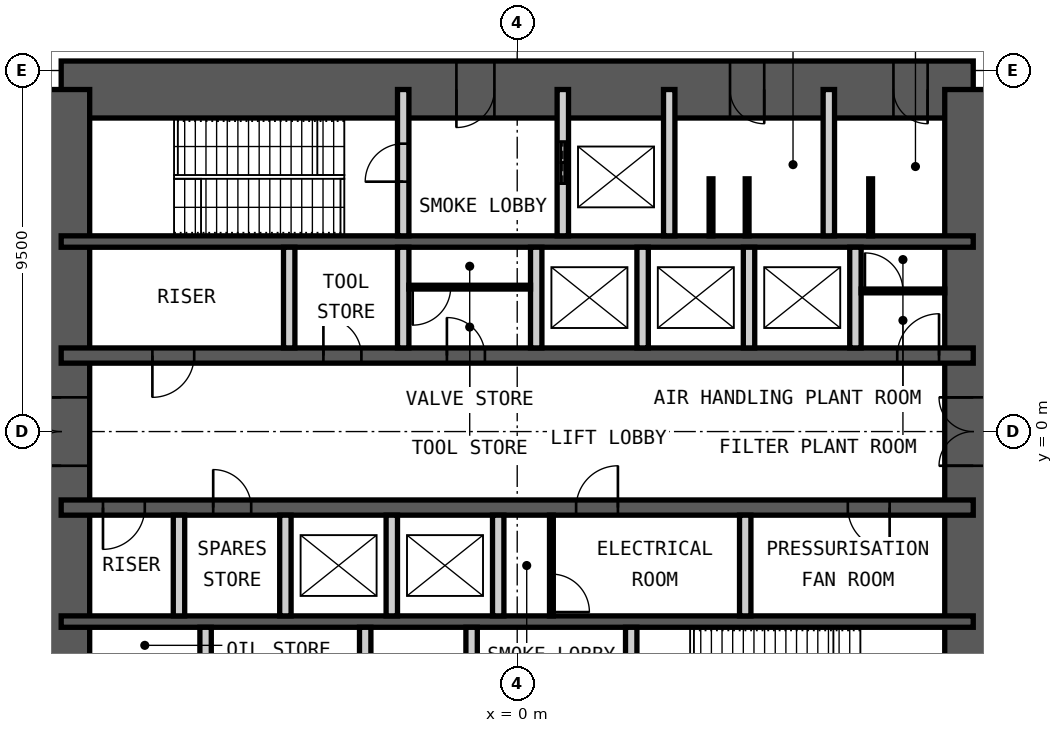
"""IFC4 building model, lengths in metres.
Left out: names, types, materials, properties, quantities, classifications, styles, units other than length and angle.
Written with IfcOpenShell. Run it as: python <this file> out.ifc"""

import sys

from ifc_helpers import new_model, si_unit, direction, frame, frame_2d, origin, place, context, subcontext, project, spatial, rectangle, extrude, element, fill, save


model = new_model("IFC4")
c1 = context("Model", 3, precision=1e-05, world=origin(), true_north=direction((0.0, 1.0)))
c2 = subcontext(c1, "Body", "Model", "MODEL_VIEW")
j1 = project(units=[si_unit("LENGTHUNIT", "METRE"), si_unit("PLANEANGLEUNIT", "RADIAN")], contexts=[c1])
p1 = place(None, origin())
s1 = spatial("IfcSite", under=j1, at=p1, CompositionType="ELEMENT")
p2 = place(p1, origin())
s2 = spatial("IfcBuilding", under=s1, at=p2, CompositionType="ELEMENT")
p3 = place(p2, frame((0.0, 0.0, 174.4)))
s3 = spatial("IfcBuildingStorey", under=s2, at=p3, CompositionType="ELEMENT", Elevation=174.4)
p4 = place(p3, frame((-12.0, 9.0, 0.0), z_axis=(0.0, 0.0, 1.0), x_axis=(1.0, 0.0, 0.0)))
e1 = element("IfcWall", 1, at=p4, inside=s3, PredefinedType="SHEAR", context=c2, shape_type="SweptSolid", body=[
    extrude(rectangle(XDim=24.0, YDim=1.5, at=frame_2d((12.0, 0.0))), origin(), (0.0, 0.0, 1.0), 6.0),
])
p5 = place(p4, frame((10.4, 0.0, 0.0)))
e2 = element("IfcOpeningElement", 2, at=p5, cuts=e1, PredefinedType="OPENING", context=c2, shape_type="SweptSolid", body=[
    extrude(rectangle(XDim=1.0, YDim=2.1, at=frame_2d((0.5, 1.05))), frame((0.0, 0.76, 0.0), z_axis=(0.0, -1.0, 0.0), x_axis=(1.0, 0.0, 0.0)), (0.0, 0.0, 1.0), 1.52),
])
p6 = place(p4, frame((17.6, 0.0, 0.0)))
e3 = element("IfcOpeningElement", 3, at=p6, cuts=e1, PredefinedType="OPENING", context=c2, shape_type="SweptSolid", body=[
    extrude(rectangle(XDim=0.9, YDim=2.1, at=frame_2d((0.45, 1.05))), frame((0.0, 0.76, 0.0), z_axis=(0.0, -1.0, 0.0), x_axis=(1.0, 0.0, 0.0)), (0.0, 0.0, 1.0), 1.52),
])
p7 = place(p4, frame((21.9, 0.0, 0.0)))
e4 = element("IfcOpeningElement", 4, at=p7, cuts=e1, PredefinedType="OPENING", context=c2, shape_type="SweptSolid", body=[
    extrude(rectangle(XDim=0.9, YDim=2.1, at=frame_2d((0.45, 1.05))), frame((0.0, 0.76, 0.0), z_axis=(0.0, -1.0, 0.0), x_axis=(1.0, 0.0, 0.0)), (0.0, 0.0, 1.0), 1.52),
])
p8 = place(p3, frame((12.0, -9.0, 0.0), z_axis=(0.0, 0.0, 1.0), x_axis=(0.0, 1.0, 0.0)))
e5 = element("IfcWall", 5, at=p8, inside=s3, PredefinedType="SHEAR", context=c2, shape_type="SweptSolid", body=[
    extrude(rectangle(XDim=18.0, YDim=1.5, at=frame_2d((9.0, 0.0))), origin(), (0.0, 0.0, 1.0), 6.0),
])
p9 = place(p8, frame((8.1, 0.0, 0.0)))
e6 = element("IfcOpeningElement", 6, at=p9, cuts=e5, PredefinedType="OPENING", context=c2, shape_type="SweptSolid", body=[
    extrude(rectangle(XDim=1.8, YDim=2.1, at=frame_2d((0.9, 1.05))), frame((0.0, 0.76, 0.0), z_axis=(0.0, -1.0, 0.0), x_axis=(1.0, 0.0, 0.0)), (0.0, 0.0, 1.0), 1.52),
])
p10 = place(p3, frame((-12.0, -9.0, 0.0), z_axis=(0.0, 0.0, 1.0), x_axis=(0.0, 1.0, 0.0)))
e7 = element("IfcWall", 7, at=p10, inside=s3, PredefinedType="SHEAR", context=c2, shape_type="SweptSolid", body=[
    extrude(rectangle(XDim=18.0, YDim=1.5, at=frame_2d((9.0, 0.0))), origin(), (0.0, 0.0, 1.0), 6.0),
])
p11 = place(p10, frame((8.1, 0.0, 0.0)))
e8 = element("IfcOpeningElement", 8, at=p11, cuts=e7, PredefinedType="OPENING", context=c2, shape_type="SweptSolid", body=[
    extrude(rectangle(XDim=1.8, YDim=2.1, at=frame_2d((0.9, 1.05))), frame((0.0, 0.76, 0.0), z_axis=(0.0, -1.0, 0.0), x_axis=(1.0, 0.0, 0.0)), (0.0, 0.0, 1.0), 1.52),
])
p12 = place(p3, frame((-12.0, 5.0, 0.0), z_axis=(0.0, 0.0, 1.0), x_axis=(1.0, 0.0, 0.0)))
e9 = element("IfcWall", 9, at=p12, inside=s3, PredefinedType="SHEAR", context=c2, shape_type="SweptSolid", body=[
    extrude(rectangle(XDim=24.0, YDim=0.3, at=frame_2d((12.0, 0.0))), origin(), (0.0, 0.0, 1.0), 6.0),
])
p13 = place(p3, frame((-12.0, 2.0, 0.0), z_axis=(0.0, 0.0, 1.0), x_axis=(1.0, 0.0, 0.0)))
e10 = element("IfcWall", 10, at=p13, inside=s3, PredefinedType="SHEAR", context=c2, shape_type="SweptSolid", body=[
    extrude(rectangle(XDim=24.0, YDim=0.4, at=frame_2d((12.0, 0.0))), origin(), (0.0, 0.0, 1.0), 6.0),
])
p14 = place(p13, frame((2.4, 0.0, 0.0)))
e11 = element("IfcOpeningElement", 11, at=p14, cuts=e10, PredefinedType="OPENING", context=c2, shape_type="SweptSolid", body=[
    extrude(rectangle(XDim=1.1, YDim=2.1, at=frame_2d((0.55, 1.05))), frame((0.0, 0.21, 0.0), z_axis=(0.0, -1.0, 0.0), x_axis=(1.0, 0.0, 0.0)), (0.0, 0.0, 1.0), 0.42),
])
p15 = place(p13, frame((22.0, 0.0, 0.0)))
e12 = element("IfcOpeningElement", 12, at=p15, cuts=e10, PredefinedType="OPENING", context=c2, shape_type="SweptSolid", body=[
    extrude(rectangle(XDim=1.1, YDim=2.1, at=frame_2d((0.55, 1.05))), frame((0.0, 0.21, 0.0), z_axis=(0.0, -1.0, 0.0), x_axis=(1.0, 0.0, 0.0)), (0.0, 0.0, 1.0), 0.42),
])
p16 = place(p13, frame((10.15, 0.0, 0.0)))
e13 = element("IfcOpeningElement", 13, at=p16, cuts=e10, PredefinedType="OPENING", context=c2, shape_type="SweptSolid", body=[
    extrude(rectangle(XDim=1.0, YDim=2.1, at=frame_2d((0.5, 1.05))), frame((0.0, 0.21, 0.0), z_axis=(0.0, -1.0, 0.0), x_axis=(1.0, 0.0, 0.0)), (0.0, 0.0, 1.0), 0.42),
])
p17 = place(p13, frame((6.9, 0.0, 0.0)))
e14 = element("IfcOpeningElement", 14, at=p17, cuts=e10, PredefinedType="OPENING", context=c2, shape_type="SweptSolid", body=[
    extrude(rectangle(XDim=1.0, YDim=2.1, at=frame_2d((0.5, 1.05))), frame((0.0, 0.21, 0.0), z_axis=(0.0, -1.0, 0.0), x_axis=(1.0, 0.0, 0.0)), (0.0, 0.0, 1.0), 0.42),
])
p18 = place(p3, frame((-12.0, -2.0, 0.0), z_axis=(0.0, 0.0, 1.0), x_axis=(1.0, 0.0, 0.0)))
e15 = element("IfcWall", 15, at=p18, inside=s3, PredefinedType="SHEAR", context=c2, shape_type="SweptSolid", body=[
    extrude(rectangle(XDim=24.0, YDim=0.4, at=frame_2d((12.0, 0.0))), origin(), (0.0, 0.0, 1.0), 6.0),
])
p19 = place(p18, frame((1.1, 0.0, 0.0)))
e16 = element("IfcOpeningElement", 16, at=p19, cuts=e15, PredefinedType="OPENING", context=c2, shape_type="SweptSolid", body=[
    extrude(rectangle(XDim=1.1, YDim=2.1, at=frame_2d((0.55, 1.05))), frame((0.0, 0.21, 0.0), z_axis=(0.0, -1.0, 0.0), x_axis=(1.0, 0.0, 0.0)), (0.0, 0.0, 1.0), 0.42),
])
p20 = place(p18, frame((13.55, 0.0, 0.0)))
e17 = element("IfcOpeningElement", 17, at=p20, cuts=e15, PredefinedType="OPENING", context=c2, shape_type="SweptSolid", body=[
    extrude(rectangle(XDim=1.1, YDim=2.1, at=frame_2d((0.55, 1.05))), frame((0.0, 0.21, 0.0), z_axis=(0.0, -1.0, 0.0), x_axis=(1.0, 0.0, 0.0)), (0.0, 0.0, 1.0), 0.42),
])
p21 = place(p18, frame((20.7, 0.0, 0.0)))
e18 = element("IfcOpeningElement", 18, at=p21, cuts=e15, PredefinedType="OPENING", context=c2, shape_type="SweptSolid", body=[
    extrude(rectangle(XDim=1.1, YDim=2.1, at=frame_2d((0.55, 1.05))), frame((0.0, 0.21, 0.0), z_axis=(0.0, -1.0, 0.0), x_axis=(1.0, 0.0, 0.0)), (0.0, 0.0, 1.0), 0.42),
])
p22 = place(p18, frame((4.0, 0.0, 0.0)))
e19 = element("IfcOpeningElement", 19, at=p22, cuts=e15, PredefinedType="OPENING", context=c2, shape_type="SweptSolid", body=[
    extrude(rectangle(XDim=1.0, YDim=2.1, at=frame_2d((0.5, 1.05))), frame((0.0, 0.21, 0.0), z_axis=(0.0, -1.0, 0.0), x_axis=(1.0, 0.0, 0.0)), (0.0, 0.0, 1.0), 0.42),
])
p23 = place(p3, frame((-12.0, -5.0, 0.0), z_axis=(0.0, 0.0, 1.0), x_axis=(1.0, 0.0, 0.0)))
e20 = element("IfcWall", 20, at=p23, inside=s3, PredefinedType="SHEAR", context=c2, shape_type="SweptSolid", body=[
    extrude(rectangle(XDim=24.0, YDim=0.3, at=frame_2d((12.0, 0.0))), origin(), (0.0, 0.0, 1.0), 6.0),
])
p24 = place(p3, frame((-3.0, 5.15, 0.0), z_axis=(0.0, 0.0, 1.0), x_axis=(0.0, 1.0, 0.0)))
e21 = element("IfcWall", 21, at=p24, inside=s3, PredefinedType="PARTITIONING", context=c2, shape_type="SweptSolid", body=[
    extrude(rectangle(XDim=3.85, YDim=0.3, at=frame_2d((1.925, 0.0))), origin(), (0.0, 0.0, 1.0), 5.78),
])
p25 = place(p24, frame((1.425, 0.0, 0.0)))
e22 = element("IfcOpeningElement", 22, at=p25, cuts=e21, PredefinedType="OPENING", context=c2, shape_type="SweptSolid", body=[
    extrude(rectangle(XDim=1.0, YDim=2.1, at=frame_2d((0.5, 1.05))), frame((0.0, 0.16, 0.0), z_axis=(0.0, -1.0, 0.0), x_axis=(1.0, 0.0, 0.0)), (0.0, 0.0, 1.0), 0.32),
])
p26 = place(p3, frame((1.2, 5.15, 0.0), z_axis=(0.0, 0.0, 1.0), x_axis=(0.0, 1.0, 0.0)))
e23 = element("IfcWall", 23, at=p26, inside=s3, PredefinedType="PARTITIONING", context=c2, shape_type="SweptSolid", body=[
    extrude(rectangle(XDim=3.85, YDim=0.3, at=frame_2d((1.925, 0.0))), origin(), (0.0, 0.0, 1.0), 5.78),
])
p27 = place(p26, frame((1.375, 0.0, 0.0)))
e24 = element("IfcOpeningElement", 24, at=p27, cuts=e23, PredefinedType="OPENING", context=c2, shape_type="SweptSolid", body=[
    extrude(rectangle(XDim=1.1, YDim=2.4, at=frame_2d((0.55, 1.2))), frame((0.0, 0.16, 0.0), z_axis=(0.0, -1.0, 0.0), x_axis=(1.0, 0.0, 0.0)), (0.0, 0.0, 1.0), 0.32),
])
for number, where, z_axis, x_axis in (
    (25, (4.0, 5.15, 0.0), (0.0, 0.0, 1.0), (0.0, 1.0, 0.0)),
    (26, (8.2, 5.15, 0.0), (0.0, 0.0, 1.0), (0.0, 1.0, 0.0)),
):
    element("IfcWall", number, at=place(p3, frame(where, z_axis=z_axis, x_axis=x_axis)), inside=s3, PredefinedType="PARTITIONING", context=c2, shape_type="SweptSolid", body=[
        extrude(rectangle(XDim=3.85, YDim=0.3, at=frame_2d((1.925, 0.0))), origin(), (0.0, 0.0, 1.0), 5.78),
    ])
for number, where, z_axis, x_axis in (
    (27, (-6.0, 2.2, 0.0), (0.0, 0.0, 1.0), (0.0, 1.0, 0.0)),
    (28, (-3.0, 2.2, 0.0), (0.0, 0.0, 1.0), (0.0, 1.0, 0.0)),
    (29, (0.5, 2.2, 0.0), (0.0, 0.0, 1.0), (0.0, 1.0, 0.0)),
    (30, (3.3, 2.2, 0.0), (0.0, 0.0, 1.0), (0.0, 1.0, 0.0)),
    (31, (6.1, 2.2, 0.0), (0.0, 0.0, 1.0), (0.0, 1.0, 0.0)),
    (32, (8.9, 2.2, 0.0), (0.0, 0.0, 1.0), (0.0, 1.0, 0.0)),
    (33, (-8.9, -4.85, 0.0), (0.0, 0.0, 1.0), (0.0, 1.0, 0.0)),
    (34, (-6.1, -4.85, 0.0), (0.0, 0.0, 1.0), (0.0, 1.0, 0.0)),
    (35, (-3.3, -4.85, 0.0), (0.0, 0.0, 1.0), (0.0, 1.0, 0.0)),
    (36, (-0.5, -4.85, 0.0), (0.0, 0.0, 1.0), (0.0, 1.0, 0.0)),
    (37, (6.0, -4.85, 0.0), (0.0, 0.0, 1.0), (0.0, 1.0, 0.0)),
):
    element("IfcWall", number, at=place(p3, frame(where, z_axis=z_axis, x_axis=x_axis)), inside=s3, PredefinedType="PARTITIONING", context=c2, shape_type="SweptSolid", body=[
        extrude(rectangle(XDim=2.65, YDim=0.3, at=frame_2d((1.325, 0.0))), origin(), (0.0, 0.0, 1.0), 5.78),
    ])
for number, where, z_axis, x_axis in (
    (38, (-8.2, -9.0, 0.0), (0.0, 0.0, 1.0), (0.0, 1.0, 0.0)),
    (39, (-4.0, -9.0, 0.0), (0.0, 0.0, 1.0), (0.0, 1.0, 0.0)),
):
    element("IfcWall", number, at=place(p3, frame(where, z_axis=z_axis, x_axis=x_axis)), inside=s3, PredefinedType="PARTITIONING", context=c2, shape_type="SweptSolid", body=[
        extrude(rectangle(XDim=3.85, YDim=0.3, at=frame_2d((1.925, 0.0))), origin(), (0.0, 0.0, 1.0), 5.78),
    ])
p28 = place(p3, frame((-1.2, -9.0, 0.0), z_axis=(0.0, 0.0, 1.0), x_axis=(0.0, 1.0, 0.0)))
e40 = element("IfcWall", 40, at=p28, inside=s3, PredefinedType="PARTITIONING", context=c2, shape_type="SweptSolid", body=[
    extrude(rectangle(XDim=3.85, YDim=0.3, at=frame_2d((1.925, 0.0))), origin(), (0.0, 0.0, 1.0), 5.78),
])
p29 = place(p28, frame((1.375, 0.0, 0.0)))
e41 = element("IfcOpeningElement", 41, at=p29, cuts=e40, PredefinedType="OPENING", context=c2, shape_type="SweptSolid", body=[
    extrude(rectangle(XDim=1.1, YDim=2.4, at=frame_2d((0.55, 1.2))), frame((0.0, 0.16, 0.0), z_axis=(0.0, -1.0, 0.0), x_axis=(1.0, 0.0, 0.0)), (0.0, 0.0, 1.0), 0.32),
])
p30 = place(p3, frame((3.0, -9.0, 0.0), z_axis=(0.0, 0.0, 1.0), x_axis=(0.0, 1.0, 0.0)))
e42 = element("IfcWall", 42, at=p30, inside=s3, PredefinedType="PARTITIONING", context=c2, shape_type="SweptSolid", body=[
    extrude(rectangle(XDim=3.85, YDim=0.3, at=frame_2d((1.925, 0.0))), origin(), (0.0, 0.0, 1.0), 5.78),
])
p31 = place(p30, frame((1.425, 0.0, 0.0)))
e43 = element("IfcOpeningElement", 43, at=p31, cuts=e42, PredefinedType="OPENING", context=c2, shape_type="SweptSolid", body=[
    extrude(rectangle(XDim=1.0, YDim=2.1, at=frame_2d((0.5, 1.05))), frame((0.0, 0.16, 0.0), z_axis=(0.0, -1.0, 0.0), x_axis=(1.0, 0.0, 0.0)), (0.0, 0.0, 1.0), 0.32),
])
p32 = place(p3, frame((-2.85, 3.8, 0.0), z_axis=(0.0, 0.0, 1.0), x_axis=(1.0, 0.0, 0.0)))
e44 = element("IfcWall", 44, at=p32, inside=s3, PredefinedType="PARTITIONING", context=c2, shape_type="SweptSolid", body=[
    extrude(rectangle(XDim=3.2, YDim=0.1, at=frame_2d((1.6, 0.0))), origin(), (0.0, 0.0, 1.0), 5.78),
])
p33 = place(p32, frame((0.1, 0.0, 0.0)))
e45 = element("IfcOpeningElement", 45, at=p33, cuts=e44, PredefinedType="OPENING", context=c2, shape_type="SweptSolid", body=[
    extrude(rectangle(XDim=1.0, YDim=2.4, at=frame_2d((0.5, 1.2))), frame((0.0, 0.06, 0.0), z_axis=(0.0, -1.0, 0.0), x_axis=(1.0, 0.0, 0.0)), (0.0, 0.0, 1.0), 0.12),
])
p34 = place(p3, frame((0.9, -4.85, 0.0), z_axis=(0.0, 0.0, 1.0), x_axis=(0.0, 1.0, 0.0)))
e46 = element("IfcWall", 46, at=p34, inside=s3, PredefinedType="PARTITIONING", context=c2, shape_type="SweptSolid", body=[
    extrude(rectangle(XDim=2.65, YDim=0.1, at=frame_2d((1.325, 0.0))), origin(), (0.0, 0.0, 1.0), 5.78),
])
p35 = place(p34, frame((0.1, 0.0, 0.0)))
e47 = element("IfcOpeningElement", 47, at=p35, cuts=e46, PredefinedType="OPENING", context=c2, shape_type="SweptSolid", body=[
    extrude(rectangle(XDim=1.0, YDim=2.4, at=frame_2d((0.5, 1.2))), frame((0.0, 0.06, 0.0), z_axis=(0.0, -1.0, 0.0), x_axis=(1.0, 0.0, 0.0)), (0.0, 0.0, 1.0), 0.12),
])
p36 = place(p3, frame((9.05, 3.7, 0.0), z_axis=(0.0, 0.0, 1.0), x_axis=(1.0, 0.0, 0.0)))
e48 = element("IfcWall", 48, at=p36, inside=s3, PredefinedType="PARTITIONING", context=c2, shape_type="SweptSolid", body=[
    extrude(rectangle(XDim=2.2, YDim=0.1, at=frame_2d((1.1, 0.0))), origin(), (0.0, 0.0, 1.0), 5.78),
])
p37 = place(p36, frame((0.1, 0.0, 0.0)))
e49 = element("IfcOpeningElement", 49, at=p37, cuts=e48, PredefinedType="OPENING", context=c2, shape_type="SweptSolid", body=[
    extrude(rectangle(XDim=1.0, YDim=2.4, at=frame_2d((0.5, 1.2))), frame((0.0, 0.06, 0.0), z_axis=(0.0, -1.0, 0.0), x_axis=(1.0, 0.0, 0.0)), (0.0, 0.0, 1.0), 0.12),
])
for number, where, z_axis, x_axis in (
    (50, (5.1, 5.15, 0.0), (0.0, 0.0, 1.0), (0.0, 1.0, 0.0)),
    (51, (6.05, 5.15, 0.0), (0.0, 0.0, 1.0), (0.0, 1.0, 0.0)),
    (52, (9.3, 5.15, 0.0), (0.0, 0.0, 1.0), (0.0, 1.0, 0.0)),
):
    element("IfcWall", number, at=place(p3, frame(where, z_axis=z_axis, x_axis=x_axis)), inside=s3, PredefinedType="PARTITIONING", context=c2, shape_type="SweptSolid", body=[
        extrude(rectangle(XDim=1.5, YDim=0.1, at=frame_2d((0.75, 0.0))), origin(), (0.0, 0.0, 1.0), 2.1),
    ])
p38 = place(p5, origin())
e53 = element("IfcDoor", 53, at=p38, inside=s3, OperationType="SINGLE_SWING_LEFT", PredefinedType="DOOR", context=c2, shape_type="SweptSolid", body=[
    extrude(rectangle(XDim=1.0, YDim=2.1, at=frame_2d((0.5, 1.05))), frame((0.0, 0.025, 0.0), z_axis=(0.0, -1.0, 0.0), x_axis=(1.0, 0.0, 0.0)), (0.0, 0.0, 1.0), 0.05),
])
fill(e2, e53)
p39 = place(p6, origin())
e54 = element("IfcDoor", 54, at=p39, inside=s3, OperationType="SINGLE_SWING_RIGHT", PredefinedType="DOOR", context=c2, shape_type="SweptSolid", body=[
    extrude(rectangle(XDim=0.9, YDim=2.1, at=frame_2d((0.45, 1.05))), frame((0.0, 0.025, 0.0), z_axis=(0.0, -1.0, 0.0), x_axis=(1.0, 0.0, 0.0)), (0.0, 0.0, 1.0), 0.05),
])
fill(e3, e54)
p40 = place(p7, origin())
e55 = element("IfcDoor", 55, at=p40, inside=s3, OperationType="SINGLE_SWING_RIGHT", PredefinedType="DOOR", context=c2, shape_type="SweptSolid", body=[
    extrude(rectangle(XDim=0.9, YDim=2.1, at=frame_2d((0.45, 1.05))), frame((0.0, 0.025, 0.0), z_axis=(0.0, -1.0, 0.0), x_axis=(1.0, 0.0, 0.0)), (0.0, 0.0, 1.0), 0.05),
])
fill(e4, e55)
p41 = place(p25, origin())
e56 = element("IfcDoor", 56, at=p41, inside=s3, OperationType="SINGLE_SWING_RIGHT", PredefinedType="DOOR", context=c2, shape_type="SweptSolid", body=[
    extrude(rectangle(XDim=1.0, YDim=2.1, at=frame_2d((0.5, 1.05))), frame((0.0, 0.025, 0.0), z_axis=(0.0, -1.0, 0.0), x_axis=(1.0, 0.0, 0.0)), (0.0, 0.0, 1.0), 0.05),
])
fill(e22, e56)
p42 = place(p14, origin())
e57 = element("IfcDoor", 57, at=p42, inside=s3, OperationType="SINGLE_SWING_LEFT", PredefinedType="DOOR", context=c2, shape_type="SweptSolid", body=[
    extrude(rectangle(XDim=1.1, YDim=2.1, at=frame_2d((0.55, 1.05))), frame((0.0, 0.025, 0.0), z_axis=(0.0, -1.0, 0.0), x_axis=(1.0, 0.0, 0.0)), (0.0, 0.0, 1.0), 0.05),
])
fill(e11, e57)
p43 = place(p19, origin())
e58 = element("IfcDoor", 58, at=p43, inside=s3, OperationType="SINGLE_SWING_LEFT", PredefinedType="DOOR", context=c2, shape_type="SweptSolid", body=[
    extrude(rectangle(XDim=1.1, YDim=2.1, at=frame_2d((0.55, 1.05))), frame((0.0, 0.025, 0.0), z_axis=(0.0, -1.0, 0.0), x_axis=(1.0, 0.0, 0.0)), (0.0, 0.0, 1.0), 0.05),
])
fill(e16, e58)
p44 = place(p15, origin())
e59 = element("IfcDoor", 59, at=p44, inside=s3, OperationType="SINGLE_SWING_LEFT", PredefinedType="DOOR", context=c2, shape_type="SweptSolid", body=[
    extrude(rectangle(XDim=1.1, YDim=2.1, at=frame_2d((0.55, 1.05))), frame((0.0, 0.025, 0.0), z_axis=(0.0, -1.0, 0.0), x_axis=(1.0, 0.0, 0.0)), (0.0, 0.0, 1.0), 0.05),
])
fill(e12, e59)
p45 = place(p16, origin())
e60 = element("IfcDoor", 60, at=p45, inside=s3, OperationType="SINGLE_SWING_RIGHT", PredefinedType="DOOR", context=c2, shape_type="SweptSolid", body=[
    extrude(rectangle(XDim=1.0, YDim=2.1, at=frame_2d((0.5, 1.05))), frame((0.0, 0.025, 0.0), z_axis=(0.0, -1.0, 0.0), x_axis=(1.0, 0.0, 0.0)), (0.0, 0.0, 1.0), 0.05),
])
fill(e13, e60)
p46 = place(p20, origin())
e61 = element("IfcDoor", 61, at=p46, inside=s3, OperationType="SINGLE_SWING_LEFT", PredefinedType="DOOR", context=c2, shape_type="SweptSolid", body=[
    extrude(rectangle(XDim=1.1, YDim=2.1, at=frame_2d((0.55, 1.05))), frame((0.0, 0.025, 0.0), z_axis=(0.0, -1.0, 0.0), x_axis=(1.0, 0.0, 0.0)), (0.0, 0.0, 1.0), 0.05),
])
fill(e17, e61)
p47 = place(p21, origin())
e62 = element("IfcDoor", 62, at=p47, inside=s3, OperationType="SINGLE_SWING_RIGHT", PredefinedType="DOOR", context=c2, shape_type="SweptSolid", body=[
    extrude(rectangle(XDim=1.1, YDim=2.1, at=frame_2d((0.55, 1.05))), frame((0.0, 0.025, 0.0), z_axis=(0.0, -1.0, 0.0), x_axis=(1.0, 0.0, 0.0)), (0.0, 0.0, 1.0), 0.05),
])
fill(e18, e62)
p48 = place(p9, origin())
e63 = element("IfcDoor", 63, at=p48, inside=s3, OperationType="DOUBLE_DOOR_DOUBLE_SWING", PredefinedType="DOOR", context=c2, shape_type="SweptSolid", body=[
    extrude(rectangle(XDim=1.8, YDim=2.1, at=frame_2d((0.9, 1.05))), frame((0.0, 0.025, 0.0), z_axis=(0.0, -1.0, 0.0), x_axis=(1.0, 0.0, 0.0)), (0.0, 0.0, 1.0), 0.05),
])
fill(e6, e63)
p49 = place(p11, origin())
e64 = element("IfcDoor", 64, at=p49, inside=s3, OperationType="DOUBLE_DOOR_DOUBLE_SWING", PredefinedType="DOOR", context=c2, shape_type="SweptSolid", body=[
    extrude(rectangle(XDim=1.8, YDim=2.1, at=frame_2d((0.9, 1.05))), frame((0.0, 0.025, 0.0), z_axis=(0.0, -1.0, 0.0), x_axis=(1.0, 0.0, 0.0)), (0.0, 0.0, 1.0), 0.05),
])
fill(e8, e64)
p50 = place(p27, origin())
e65 = element("IfcDoor", 65, at=p50, inside=s3, OperationType="DOUBLE_DOOR_SLIDING", PredefinedType="DOOR", context=c2, shape_type="SweptSolid", body=[
    extrude(rectangle(XDim=1.1, YDim=2.4, at=frame_2d((0.55, 1.2))), frame((0.0, 0.025, 0.0), z_axis=(0.0, -1.0, 0.0), x_axis=(1.0, 0.0, 0.0)), (0.0, 0.0, 1.0), 0.05),
])
fill(e24, e65)
p51 = place(p17, origin())
e66 = element("IfcDoor", 66, at=p51, inside=s3, OperationType="SINGLE_SWING_RIGHT", PredefinedType="DOOR", context=c2, shape_type="SweptSolid", body=[
    extrude(rectangle(XDim=1.0, YDim=2.1, at=frame_2d((0.5, 1.05))), frame((0.0, 0.025, 0.0), z_axis=(0.0, -1.0, 0.0), x_axis=(1.0, 0.0, 0.0)), (0.0, 0.0, 1.0), 0.05),
])
fill(e14, e66)
p52 = place(p22, origin())
e67 = element("IfcDoor", 67, at=p52, inside=s3, OperationType="SINGLE_SWING_RIGHT", PredefinedType="DOOR", context=c2, shape_type="SweptSolid", body=[
    extrude(rectangle(XDim=1.0, YDim=2.1, at=frame_2d((0.5, 1.05))), frame((0.0, 0.025, 0.0), z_axis=(0.0, -1.0, 0.0), x_axis=(1.0, 0.0, 0.0)), (0.0, 0.0, 1.0), 0.05),
])
fill(e19, e67)
p53 = place(p33, origin())
e68 = element("IfcDoor", 68, at=p53, inside=s3, OperationType="SINGLE_SWING_LEFT", PredefinedType="DOOR", context=c2, shape_type="SweptSolid", body=[
    extrude(rectangle(XDim=1.0, YDim=2.4, at=frame_2d((0.5, 1.2))), frame((0.0, 0.025, 0.0), z_axis=(0.0, -1.0, 0.0), x_axis=(1.0, 0.0, 0.0)), (0.0, 0.0, 1.0), 0.05),
])
fill(e45, e68)
p54 = place(p35, origin())
e69 = element("IfcDoor", 69, at=p54, inside=s3, OperationType="SINGLE_SWING_LEFT", PredefinedType="DOOR", context=c2, shape_type="SweptSolid", body=[
    extrude(rectangle(XDim=1.0, YDim=2.4, at=frame_2d((0.5, 1.2))), frame((0.0, 0.025, 0.0), z_axis=(0.0, -1.0, 0.0), x_axis=(1.0, 0.0, 0.0)), (0.0, 0.0, 1.0), 0.05),
])
fill(e47, e69)
p55 = place(p37, origin())
e70 = element("IfcDoor", 70, at=p55, inside=s3, OperationType="SINGLE_SWING_RIGHT", PredefinedType="DOOR", context=c2, shape_type="SweptSolid", body=[
    extrude(rectangle(XDim=1.0, YDim=2.4, at=frame_2d((0.5, 1.2))), frame((0.0, 0.025, 0.0), z_axis=(0.0, -1.0, 0.0), x_axis=(1.0, 0.0, 0.0)), (0.0, 0.0, 1.0), 0.05),
])
fill(e49, e70)
save(model, sys.argv[1])
